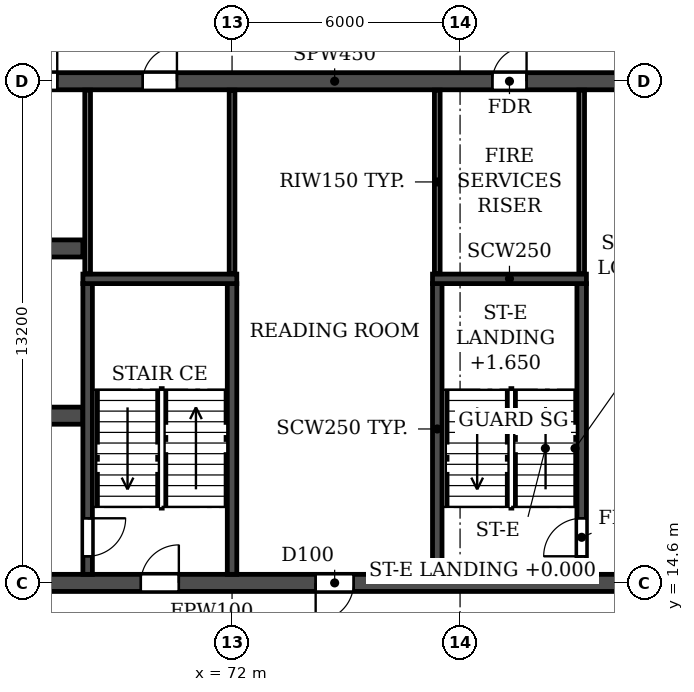
"""IFC4 building model, lengths in metres.
Left out: names, types, materials, properties, quantities, classifications, styles, units other than length and angle.
Written with IfcOpenShell. Run it as: python <this file> out.ifc"""

import sys

from ifc_helpers import new_model, si_unit, direction, frame, frame_2d, origin, place, context, subcontext, project, spatial, rectangle, extrude, element, fill, save


model = new_model("IFC4")
c1 = context("Model", 3, precision=1e-05, world=origin(), true_north=direction((0.0, 1.0)))
c2 = subcontext(c1, "Body", "Model", "MODEL_VIEW")
j1 = project(units=[si_unit("LENGTHUNIT", "METRE"), si_unit("PLANEANGLEUNIT", "RADIAN")], contexts=[c1])
p1 = place(None, origin())
s1 = spatial("IfcSite", under=j1, at=p1, CompositionType="ELEMENT")
p2 = place(p1, origin())
s2 = spatial("IfcBuilding", under=s1, at=p2, CompositionType="ELEMENT")
p3 = place(p2, frame((0.0, 0.0, 132.3)))
s3 = spatial("IfcBuildingStorey", under=s2, at=p3, CompositionType="ELEMENT", Elevation=132.3)
p4 = place(p3, frame((12.2, 14.6, 0.0), z_axis=(0.0, 0.0, 1.0), x_axis=(1.0, 0.0, 0.0)))
e1 = element("IfcWall", 1, at=p4, inside=s3, PredefinedType="SOLIDWALL", context=c2, shape_type="SweptSolid", body=[
    extrude(rectangle(XDim=77.6, YDim=0.45, at=frame_2d((38.8, 0.0))), origin(), (0.0, 0.0, 1.0), 3.07),
])
p5 = place(p4, frame((2.3, 0.0, 0.0)))
e2 = element("IfcOpeningElement", 2, at=p5, cuts=e1, PredefinedType="OPENING", context=c2, shape_type="SweptSolid", body=[
    extrude(rectangle(XDim=1.0, YDim=2.1, at=frame_2d((0.5, 1.05))), frame((0.0, 0.235, 0.0), z_axis=(0.0, -1.0, 0.0), x_axis=(1.0, 0.0, 0.0)), (0.0, 0.0, 1.0), 0.47),
])
p6 = place(p4, frame((6.7, 0.0, 0.0)))
e3 = element("IfcOpeningElement", 3, at=p6, cuts=e1, PredefinedType="OPENING", context=c2, shape_type="SweptSolid", body=[
    extrude(rectangle(XDim=1.0, YDim=2.1, at=frame_2d((0.5, 1.05))), frame((0.0, 0.235, 0.0), z_axis=(0.0, -1.0, 0.0), x_axis=(1.0, 0.0, 0.0)), (0.0, 0.0, 1.0), 0.47),
])
p7 = place(p4, frame((14.6, 0.0, 0.0)))
e4 = element("IfcOpeningElement", 4, at=p7, cuts=e1, PredefinedType="OPENING", context=c2, shape_type="SweptSolid", body=[
    extrude(rectangle(XDim=1.0, YDim=2.1, at=frame_2d((0.5, 1.05))), frame((0.0, 0.235, 0.0), z_axis=(0.0, -1.0, 0.0), x_axis=(1.0, 0.0, 0.0)), (0.0, 0.0, 1.0), 0.47),
])
p8 = place(p4, frame((19.2, 0.0, 0.0)))
e5 = element("IfcOpeningElement", 5, at=p8, cuts=e1, PredefinedType="OPENING", context=c2, shape_type="SweptSolid", body=[
    extrude(rectangle(XDim=1.0, YDim=2.1, at=frame_2d((0.5, 1.05))), frame((0.0, 0.235, 0.0), z_axis=(0.0, -1.0, 0.0), x_axis=(1.0, 0.0, 0.0)), (0.0, 0.0, 1.0), 0.47),
])
p9 = place(p4, frame((31.55, 0.0, 0.0)))
e6 = element("IfcOpeningElement", 6, at=p9, cuts=e1, PredefinedType="OPENING", context=c2, shape_type="SweptSolid", body=[
    extrude(rectangle(XDim=1.5, YDim=2.1, at=frame_2d((0.75, 1.05))), frame((0.0, 0.235, 0.0), z_axis=(0.0, -1.0, 0.0), x_axis=(1.0, 0.0, 0.0)), (0.0, 0.0, 1.0), 0.47),
])
p10 = place(p4, frame((35.7, 0.0, 0.0)))
e7 = element("IfcOpeningElement", 7, at=p10, cuts=e1, PredefinedType="OPENING", context=c2, shape_type="SweptSolid", body=[
    extrude(rectangle(XDim=1.0, YDim=2.1, at=frame_2d((0.5, 1.05))), frame((0.0, 0.235, 0.0), z_axis=(0.0, -1.0, 0.0), x_axis=(1.0, 0.0, 0.0)), (0.0, 0.0, 1.0), 0.47),
])
p11 = place(p4, frame((38.3, 0.0, 0.0)))
e8 = element("IfcOpeningElement", 8, at=p11, cuts=e1, PredefinedType="OPENING", context=c2, shape_type="SweptSolid", body=[
    extrude(rectangle(XDim=1.0, YDim=2.1, at=frame_2d((0.5, 1.05))), frame((0.0, 0.235, 0.0), z_axis=(0.0, -1.0, 0.0), x_axis=(1.0, 0.0, 0.0)), (0.0, 0.0, 1.0), 0.47),
])
p12 = place(p4, frame((40.9, 0.0, 0.0)))
e9 = element("IfcOpeningElement", 9, at=p12, cuts=e1, PredefinedType="OPENING", context=c2, shape_type="SweptSolid", body=[
    extrude(rectangle(XDim=1.0, YDim=2.1, at=frame_2d((0.5, 1.05))), frame((0.0, 0.235, 0.0), z_axis=(0.0, -1.0, 0.0), x_axis=(1.0, 0.0, 0.0)), (0.0, 0.0, 1.0), 0.47),
])
p13 = place(p4, frame((44.55, 0.0, 0.0)))
e10 = element("IfcOpeningElement", 10, at=p13, cuts=e1, PredefinedType="OPENING", context=c2, shape_type="SweptSolid", body=[
    extrude(rectangle(XDim=1.5, YDim=2.1, at=frame_2d((0.75, 1.05))), frame((0.0, 0.235, 0.0), z_axis=(0.0, -1.0, 0.0), x_axis=(1.0, 0.0, 0.0)), (0.0, 0.0, 1.0), 0.47),
])
p14 = place(p4, frame((57.4, 0.0, 0.0)))
e11 = element("IfcOpeningElement", 11, at=p14, cuts=e1, PredefinedType="OPENING", context=c2, shape_type="SweptSolid", body=[
    extrude(rectangle(XDim=1.0, YDim=2.1, at=frame_2d((0.5, 1.05))), frame((0.0, 0.235, 0.0), z_axis=(0.0, -1.0, 0.0), x_axis=(1.0, 0.0, 0.0)), (0.0, 0.0, 1.0), 0.47),
])
p15 = place(p4, frame((62.0, 0.0, 0.0)))
e12 = element("IfcOpeningElement", 12, at=p15, cuts=e1, PredefinedType="OPENING", context=c2, shape_type="SweptSolid", body=[
    extrude(rectangle(XDim=1.0, YDim=2.1, at=frame_2d((0.5, 1.05))), frame((0.0, 0.235, 0.0), z_axis=(0.0, -1.0, 0.0), x_axis=(1.0, 0.0, 0.0)), (0.0, 0.0, 1.0), 0.47),
])
p16 = place(p4, frame((69.9, 0.0, 0.0)))
e13 = element("IfcOpeningElement", 13, at=p16, cuts=e1, PredefinedType="OPENING", context=c2, shape_type="SweptSolid", body=[
    extrude(rectangle(XDim=1.0, YDim=2.1, at=frame_2d((0.5, 1.05))), frame((0.0, 0.235, 0.0), z_axis=(0.0, -1.0, 0.0), x_axis=(1.0, 0.0, 0.0)), (0.0, 0.0, 1.0), 0.47),
])
p17 = place(p4, frame((74.3, 0.0, 0.0)))
e14 = element("IfcOpeningElement", 14, at=p17, cuts=e1, PredefinedType="OPENING", context=c2, shape_type="SweptSolid", body=[
    extrude(rectangle(XDim=1.0, YDim=2.1, at=frame_2d((0.5, 1.05))), frame((0.0, 0.235, 0.0), z_axis=(0.0, -1.0, 0.0), x_axis=(1.0, 0.0, 0.0)), (0.0, 0.0, 1.0), 0.47),
])
p18 = place(p3, frame((12.2, 27.8, 0.0), z_axis=(0.0, 0.0, 1.0), x_axis=(1.0, 0.0, 0.0)))
e15 = element("IfcWall", 15, at=p18, inside=s3, PredefinedType="SOLIDWALL", context=c2, shape_type="SweptSolid", body=[
    extrude(rectangle(XDim=77.6, YDim=0.45, at=frame_2d((38.8, 0.0))), origin(), (0.0, 0.0, 1.0), 3.07),
])
p19 = place(p18, frame((2.05, 0.0, 0.0)))
e16 = element("IfcOpeningElement", 16, at=p19, cuts=e15, PredefinedType="OPENING", context=c2, shape_type="SweptSolid", body=[
    extrude(rectangle(XDim=1.5, YDim=2.1, at=frame_2d((0.75, 1.05))), frame((0.0, 0.235, 0.0), z_axis=(0.0, -1.0, 0.0), x_axis=(1.0, 0.0, 0.0)), (0.0, 0.0, 1.0), 0.47),
])
p20 = place(p18, frame((6.7, 0.0, 0.0)))
e17 = element("IfcOpeningElement", 17, at=p20, cuts=e15, PredefinedType="OPENING", context=c2, shape_type="SweptSolid", body=[
    extrude(rectangle(XDim=1.0, YDim=2.1, at=frame_2d((0.5, 1.05))), frame((0.0, 0.235, 0.0), z_axis=(0.0, -1.0, 0.0), x_axis=(1.0, 0.0, 0.0)), (0.0, 0.0, 1.0), 0.47),
])
p21 = place(p18, frame((10.05, 0.0, 0.0)))
e18 = element("IfcOpeningElement", 18, at=p21, cuts=e15, PredefinedType="OPENING", context=c2, shape_type="SweptSolid", body=[
    extrude(rectangle(XDim=0.9, YDim=2.1, at=frame_2d((0.45, 1.05))), frame((0.0, 0.235, 0.0), z_axis=(0.0, -1.0, 0.0), x_axis=(1.0, 0.0, 0.0)), (0.0, 0.0, 1.0), 0.47),
])
p22 = place(p18, frame((19.25, 0.0, 0.0)))
e19 = element("IfcOpeningElement", 19, at=p22, cuts=e15, PredefinedType="OPENING", context=c2, shape_type="SweptSolid", body=[
    extrude(rectangle(XDim=0.9, YDim=2.1, at=frame_2d((0.45, 1.05))), frame((0.0, 0.235, 0.0), z_axis=(0.0, -1.0, 0.0), x_axis=(1.0, 0.0, 0.0)), (0.0, 0.0, 1.0), 0.47),
])
p23 = place(p18, frame((22.4, 0.0, 0.0)))
e20 = element("IfcOpeningElement", 20, at=p23, cuts=e15, PredefinedType="OPENING", context=c2, shape_type="SweptSolid", body=[
    extrude(rectangle(XDim=1.0, YDim=2.1, at=frame_2d((0.5, 1.05))), frame((0.0, 0.235, 0.0), z_axis=(0.0, -1.0, 0.0), x_axis=(1.0, 0.0, 0.0)), (0.0, 0.0, 1.0), 0.47),
])
p24 = place(p18, frame((27.6, 0.0, 0.0)))
e21 = element("IfcOpeningElement", 21, at=p24, cuts=e15, PredefinedType="OPENING", context=c2, shape_type="SweptSolid", body=[
    extrude(rectangle(XDim=1.0, YDim=2.1, at=frame_2d((0.5, 1.05))), frame((0.0, 0.235, 0.0), z_axis=(0.0, -1.0, 0.0), x_axis=(1.0, 0.0, 0.0)), (0.0, 0.0, 1.0), 0.47),
])
p25 = place(p18, frame((35.4, 0.0, 0.0)))
e22 = element("IfcOpeningElement", 22, at=p25, cuts=e15, PredefinedType="OPENING", context=c2, shape_type="SweptSolid", body=[
    extrude(rectangle(XDim=1.0, YDim=2.1, at=frame_2d((0.5, 1.05))), frame((0.0, 0.235, 0.0), z_axis=(0.0, -1.0, 0.0), x_axis=(1.0, 0.0, 0.0)), (0.0, 0.0, 1.0), 0.47),
])
p26 = place(p18, frame((38.3, 0.0, 0.0)))
e23 = element("IfcOpeningElement", 23, at=p26, cuts=e15, PredefinedType="OPENING", context=c2, shape_type="SweptSolid", body=[
    extrude(rectangle(XDim=1.0, YDim=2.1, at=frame_2d((0.5, 1.05))), frame((0.0, 0.235, 0.0), z_axis=(0.0, -1.0, 0.0), x_axis=(1.0, 0.0, 0.0)), (0.0, 0.0, 1.0), 0.47),
])
p27 = place(p18, frame((41.2, 0.0, 0.0)))
e24 = element("IfcOpeningElement", 24, at=p27, cuts=e15, PredefinedType="OPENING", context=c2, shape_type="SweptSolid", body=[
    extrude(rectangle(XDim=1.0, YDim=2.1, at=frame_2d((0.5, 1.05))), frame((0.0, 0.235, 0.0), z_axis=(0.0, -1.0, 0.0), x_axis=(1.0, 0.0, 0.0)), (0.0, 0.0, 1.0), 0.47),
])
p28 = place(p18, frame((43.8, 0.0, 0.0)))
e25 = element("IfcOpeningElement", 25, at=p28, cuts=e15, PredefinedType="OPENING", context=c2, shape_type="SweptSolid", body=[
    extrude(rectangle(XDim=1.0, YDim=2.1, at=frame_2d((0.5, 1.05))), frame((0.0, 0.235, 0.0), z_axis=(0.0, -1.0, 0.0), x_axis=(1.0, 0.0, 0.0)), (0.0, 0.0, 1.0), 0.47),
])
p29 = place(p18, frame((47.7, 0.0, 0.0)))
e26 = element("IfcOpeningElement", 26, at=p29, cuts=e15, PredefinedType="OPENING", context=c2, shape_type="SweptSolid", body=[
    extrude(rectangle(XDim=1.0, YDim=2.1, at=frame_2d((0.5, 1.05))), frame((0.0, 0.235, 0.0), z_axis=(0.0, -1.0, 0.0), x_axis=(1.0, 0.0, 0.0)), (0.0, 0.0, 1.0), 0.47),
])
p30 = place(p18, frame((51.6, 0.0, 0.0)))
e27 = element("IfcOpeningElement", 27, at=p30, cuts=e15, PredefinedType="OPENING", context=c2, shape_type="SweptSolid", body=[
    extrude(rectangle(XDim=1.0, YDim=2.1, at=frame_2d((0.5, 1.05))), frame((0.0, 0.235, 0.0), z_axis=(0.0, -1.0, 0.0), x_axis=(1.0, 0.0, 0.0)), (0.0, 0.0, 1.0), 0.47),
])
p31 = place(p18, frame((54.2, 0.0, 0.0)))
e28 = element("IfcOpeningElement", 28, at=p31, cuts=e15, PredefinedType="OPENING", context=c2, shape_type="SweptSolid", body=[
    extrude(rectangle(XDim=1.0, YDim=2.1, at=frame_2d((0.5, 1.05))), frame((0.0, 0.235, 0.0), z_axis=(0.0, -1.0, 0.0), x_axis=(1.0, 0.0, 0.0)), (0.0, 0.0, 1.0), 0.47),
])
p32 = place(p18, frame((57.45, 0.0, 0.0)))
e29 = element("IfcOpeningElement", 29, at=p32, cuts=e15, PredefinedType="OPENING", context=c2, shape_type="SweptSolid", body=[
    extrude(rectangle(XDim=0.9, YDim=2.1, at=frame_2d((0.45, 1.05))), frame((0.0, 0.235, 0.0), z_axis=(0.0, -1.0, 0.0), x_axis=(1.0, 0.0, 0.0)), (0.0, 0.0, 1.0), 0.47),
])
p33 = place(p18, frame((66.65, 0.0, 0.0)))
e30 = element("IfcOpeningElement", 30, at=p33, cuts=e15, PredefinedType="OPENING", context=c2, shape_type="SweptSolid", body=[
    extrude(rectangle(XDim=0.9, YDim=2.1, at=frame_2d((0.45, 1.05))), frame((0.0, 0.235, 0.0), z_axis=(0.0, -1.0, 0.0), x_axis=(1.0, 0.0, 0.0)), (0.0, 0.0, 1.0), 0.47),
])
p34 = place(p18, frame((69.9, 0.0, 0.0)))
e31 = element("IfcOpeningElement", 31, at=p34, cuts=e15, PredefinedType="OPENING", context=c2, shape_type="SweptSolid", body=[
    extrude(rectangle(XDim=1.0, YDim=2.1, at=frame_2d((0.5, 1.05))), frame((0.0, 0.235, 0.0), z_axis=(0.0, -1.0, 0.0), x_axis=(1.0, 0.0, 0.0)), (0.0, 0.0, 1.0), 0.47),
])
p35 = place(p18, frame((74.3, 0.0, 0.0)))
e32 = element("IfcOpeningElement", 32, at=p35, cuts=e15, PredefinedType="OPENING", context=c2, shape_type="SweptSolid", body=[
    extrude(rectangle(XDim=1.0, YDim=2.1, at=frame_2d((0.5, 1.05))), frame((0.0, 0.235, 0.0), z_axis=(0.0, -1.0, 0.0), x_axis=(1.0, 0.0, 0.0)), (0.0, 0.0, 1.0), 0.47),
])
p36 = place(p3, frame((33.925, 19.0, 0.0), z_axis=(0.0, 0.0, 1.0), x_axis=(1.0, 0.0, 0.0)))
e33 = element("IfcWall", 33, at=p36, inside=s3, PredefinedType="SOLIDWALL", context=c2, shape_type="SweptSolid", body=[
    extrude(rectangle(XDim=34.15, YDim=0.45, at=frame_2d((17.075, 0.0))), origin(), (0.0, 0.0, 1.0), 3.07),
])
p37 = place(p36, frame((16.175, 0.0, 0.0)))
e34 = element("IfcOpeningElement", 34, at=p37, cuts=e33, PredefinedType="OPENING", context=c2, shape_type="SweptSolid", body=[
    extrude(rectangle(XDim=1.8, YDim=2.1, at=frame_2d((0.9, 1.05))), frame((0.0, 0.235, 0.0), z_axis=(0.0, -1.0, 0.0), x_axis=(1.0, 0.0, 0.0)), (0.0, 0.0, 1.0), 0.47),
])
p38 = place(p36, frame((1.525, 0.0, 0.0)))
e35 = element("IfcOpeningElement", 35, at=p38, cuts=e33, PredefinedType="OPENING", context=c2, shape_type="SweptSolid", body=[
    extrude(rectangle(XDim=1.8, YDim=2.1, at=frame_2d((0.9, 1.05))), frame((0.0, 0.235, 0.0), z_axis=(0.0, -1.0, 0.0), x_axis=(1.0, 0.0, 0.0)), (0.0, 0.0, 1.0), 0.47),
])
p39 = place(p36, frame((30.825, 0.0, 0.0)))
e36 = element("IfcOpeningElement", 36, at=p39, cuts=e33, PredefinedType="OPENING", context=c2, shape_type="SweptSolid", body=[
    extrude(rectangle(XDim=1.8, YDim=2.1, at=frame_2d((0.9, 1.05))), frame((0.0, 0.235, 0.0), z_axis=(0.0, -1.0, 0.0), x_axis=(1.0, 0.0, 0.0)), (0.0, 0.0, 1.0), 0.47),
])
p40 = place(p3, frame((33.925, 23.4, 0.0), z_axis=(0.0, 0.0, 1.0), x_axis=(1.0, 0.0, 0.0)))
e37 = element("IfcWall", 37, at=p40, inside=s3, PredefinedType="SOLIDWALL", context=c2, shape_type="SweptSolid", body=[
    extrude(rectangle(XDim=34.15, YDim=0.45, at=frame_2d((17.075, 0.0))), origin(), (0.0, 0.0, 1.0), 3.07),
])
p41 = place(p40, frame((16.175, 0.0, 0.0)))
e38 = element("IfcOpeningElement", 38, at=p41, cuts=e37, PredefinedType="OPENING", context=c2, shape_type="SweptSolid", body=[
    extrude(rectangle(XDim=1.8, YDim=2.1, at=frame_2d((0.9, 1.05))), frame((0.0, 0.235, 0.0), z_axis=(0.0, -1.0, 0.0), x_axis=(1.0, 0.0, 0.0)), (0.0, 0.0, 1.0), 0.47),
])
p42 = place(p40, frame((0.625, 0.0, 0.0)))
e39 = element("IfcOpeningElement", 39, at=p42, cuts=e37, PredefinedType="OPENING", context=c2, shape_type="SweptSolid", body=[
    extrude(rectangle(XDim=1.1, YDim=2.1, at=frame_2d((0.55, 1.05))), frame((0.0, 0.235, 0.0), z_axis=(0.0, -1.0, 0.0), x_axis=(1.0, 0.0, 0.0)), (0.0, 0.0, 1.0), 0.47),
])
p43 = place(p40, frame((3.225, 0.0, 0.0)))
e40 = element("IfcOpeningElement", 40, at=p43, cuts=e37, PredefinedType="OPENING", context=c2, shape_type="SweptSolid", body=[
    extrude(rectangle(XDim=1.1, YDim=2.1, at=frame_2d((0.55, 1.05))), frame((0.0, 0.235, 0.0), z_axis=(0.0, -1.0, 0.0), x_axis=(1.0, 0.0, 0.0)), (0.0, 0.0, 1.0), 0.47),
])
p44 = place(p40, frame((5.825, 0.0, 0.0)))
e41 = element("IfcOpeningElement", 41, at=p44, cuts=e37, PredefinedType="OPENING", context=c2, shape_type="SweptSolid", body=[
    extrude(rectangle(XDim=1.1, YDim=2.1, at=frame_2d((0.55, 1.05))), frame((0.0, 0.235, 0.0), z_axis=(0.0, -1.0, 0.0), x_axis=(1.0, 0.0, 0.0)), (0.0, 0.0, 1.0), 0.47),
])
p45 = place(p40, frame((8.425, 0.0, 0.0)))
e42 = element("IfcOpeningElement", 42, at=p45, cuts=e37, PredefinedType="OPENING", context=c2, shape_type="SweptSolid", body=[
    extrude(rectangle(XDim=1.1, YDim=2.1, at=frame_2d((0.55, 1.05))), frame((0.0, 0.235, 0.0), z_axis=(0.0, -1.0, 0.0), x_axis=(1.0, 0.0, 0.0)), (0.0, 0.0, 1.0), 0.47),
])
p46 = place(p40, frame((11.025, 0.0, 0.0)))
e43 = element("IfcOpeningElement", 43, at=p46, cuts=e37, PredefinedType="OPENING", context=c2, shape_type="SweptSolid", body=[
    extrude(rectangle(XDim=1.1, YDim=2.1, at=frame_2d((0.55, 1.05))), frame((0.0, 0.235, 0.0), z_axis=(0.0, -1.0, 0.0), x_axis=(1.0, 0.0, 0.0)), (0.0, 0.0, 1.0), 0.47),
])
p47 = place(p40, frame((13.625, 0.0, 0.0)))
e44 = element("IfcOpeningElement", 44, at=p47, cuts=e37, PredefinedType="OPENING", context=c2, shape_type="SweptSolid", body=[
    extrude(rectangle(XDim=1.1, YDim=2.1, at=frame_2d((0.55, 1.05))), frame((0.0, 0.235, 0.0), z_axis=(0.0, -1.0, 0.0), x_axis=(1.0, 0.0, 0.0)), (0.0, 0.0, 1.0), 0.47),
])
p48 = place(p40, frame((27.225, 0.0, 0.0)))
e45 = element("IfcOpeningElement", 45, at=p48, cuts=e37, PredefinedType="OPENING", context=c2, shape_type="SweptSolid", body=[
    extrude(rectangle(XDim=1.1, YDim=2.1, at=frame_2d((0.55, 1.05))), frame((0.0, 0.235, 0.0), z_axis=(0.0, -1.0, 0.0), x_axis=(1.0, 0.0, 0.0)), (0.0, 0.0, 1.0), 0.47),
])
p49 = place(p3, frame((68.2, 14.825, 0.0), z_axis=(0.0, 0.0, 1.0), x_axis=(0.0, 1.0, 0.0)))
e46 = element("IfcWall", 46, at=p49, inside=s3, PredefinedType="SOLIDWALL", context=c2, shape_type="SweptSolid", body=[
    extrude(rectangle(XDim=7.65, YDim=0.25, at=frame_2d((3.825, 0.0))), origin(), (0.0, 0.0, 1.0), 3.07),
])
p50 = place(p49, frame((0.475, 0.0, 0.0)))
e47 = element("IfcOpeningElement", 47, at=p50, cuts=e46, PredefinedType="OPENING", context=c2, shape_type="SweptSolid", body=[
    extrude(rectangle(XDim=1.0, YDim=2.1, at=frame_2d((0.5, 1.05))), frame((0.0, 0.135, 0.0), z_axis=(0.0, -1.0, 0.0), x_axis=(1.0, 0.0, 0.0)), (0.0, 0.0, 1.0), 0.27),
])
p51 = place(p3, frame((72.0, 14.825, 0.0), z_axis=(0.0, 0.0, 1.0), x_axis=(0.0, 1.0, 0.0)))
e48 = element("IfcWall", 48, at=p51, inside=s3, PredefinedType="SOLIDWALL", context=c2, shape_type="SweptSolid", body=[
    extrude(rectangle(XDim=7.65, YDim=0.25, at=frame_2d((3.825, 0.0))), origin(), (0.0, 0.0, 1.0), 3.07),
])
p52 = place(p3, frame((68.075, 22.6, 0.0), z_axis=(0.0, 0.0, 1.0), x_axis=(1.0, 0.0, 0.0)))
e49 = element("IfcWall", 49, at=p52, inside=s3, PredefinedType="SOLIDWALL", context=c2, shape_type="SweptSolid", body=[
    extrude(rectangle(XDim=4.05, YDim=0.25, at=frame_2d((2.025, 0.0))), origin(), (0.0, 0.0, 1.0), 3.07),
])
p53 = place(p3, frame((77.4, 14.825, 0.0), z_axis=(0.0, 0.0, 1.0), x_axis=(0.0, 1.0, 0.0)))
e50 = element("IfcWall", 50, at=p53, inside=s3, PredefinedType="SOLIDWALL", context=c2, shape_type="SweptSolid", body=[
    extrude(rectangle(XDim=7.65, YDim=0.25, at=frame_2d((3.825, 0.0))), origin(), (0.0, 0.0, 1.0), 3.07),
])
p54 = place(p3, frame((81.2, 14.825, 0.0), z_axis=(0.0, 0.0, 1.0), x_axis=(0.0, 1.0, 0.0)))
e51 = element("IfcWall", 51, at=p54, inside=s3, PredefinedType="SOLIDWALL", context=c2, shape_type="SweptSolid", body=[
    extrude(rectangle(XDim=7.65, YDim=0.25, at=frame_2d((3.825, 0.0))), origin(), (0.0, 0.0, 1.0), 3.07),
])
p55 = place(p54, frame((0.475, 0.0, 0.0)))
e52 = element("IfcOpeningElement", 52, at=p55, cuts=e51, PredefinedType="OPENING", context=c2, shape_type="SweptSolid", body=[
    extrude(rectangle(XDim=1.0, YDim=2.1, at=frame_2d((0.5, 1.05))), frame((0.0, 0.135, 0.0), z_axis=(0.0, -1.0, 0.0), x_axis=(1.0, 0.0, 0.0)), (0.0, 0.0, 1.0), 0.27),
])
p56 = place(p3, frame((77.275, 22.6, 0.0), z_axis=(0.0, 0.0, 1.0), x_axis=(1.0, 0.0, 0.0)))
e53 = element("IfcWall", 53, at=p56, inside=s3, PredefinedType="SOLIDWALL", context=c2, shape_type="SweptSolid", body=[
    extrude(rectangle(XDim=4.05, YDim=0.25, at=frame_2d((2.025, 0.0))), origin(), (0.0, 0.0, 1.0), 3.07),
])
for number, where, z_axis, x_axis in (
    (54, (68.2, 22.735, 0.0), (0.0, 0.0, 1.0), (0.0, 1.0, 0.0)),
    (55, (72.0, 22.735, 0.0), (0.0, 0.0, 1.0), (0.0, 1.0, 0.0)),
    (56, (77.4, 22.735, 0.0), (0.0, 0.0, 1.0), (0.0, 1.0, 0.0)),
    (57, (81.2, 22.735, 0.0), (0.0, 0.0, 1.0), (0.0, 1.0, 0.0)),
):
    element("IfcWall", number, at=place(p3, frame(where, z_axis=z_axis, x_axis=x_axis)), inside=s3, PredefinedType="PARTITIONING", context=c2, shape_type="SweptSolid", body=[
        extrude(rectangle(XDim=4.83, YDim=0.15, at=frame_2d((2.415, 0.0))), origin(), (0.0, 0.0, 1.0), 3.07),
    ])
p57 = place(p31, origin())
e58 = element("IfcDoor", 58, at=p57, inside=s3, OperationType="SINGLE_SWING_RIGHT", PredefinedType="DOOR", context=c2, shape_type="SweptSolid", body=[
    extrude(rectangle(XDim=1.0, YDim=2.1, at=frame_2d((0.5, 1.05))), frame((0.0, 0.025, 0.0), z_axis=(0.0, -1.0, 0.0), x_axis=(1.0, 0.0, 0.0)), (0.0, 0.0, 1.0), 0.05),
])
fill(e28, e58)
p58 = place(p32, origin())
e59 = element("IfcDoor", 59, at=p58, inside=s3, OperationType="SINGLE_SWING_RIGHT", PredefinedType="DOOR", context=c2, shape_type="SweptSolid", body=[
    extrude(rectangle(XDim=0.9, YDim=2.1, at=frame_2d((0.45, 1.05))), frame((0.0, 0.025, 0.0), z_axis=(0.0, -1.0, 0.0), x_axis=(1.0, 0.0, 0.0)), (0.0, 0.0, 1.0), 0.05),
])
fill(e29, e59)
p59 = place(p33, origin())
e60 = element("IfcDoor", 60, at=p59, inside=s3, OperationType="SINGLE_SWING_RIGHT", PredefinedType="DOOR", context=c2, shape_type="SweptSolid", body=[
    extrude(rectangle(XDim=0.9, YDim=2.1, at=frame_2d((0.45, 1.05))), frame((0.0, 0.025, 0.0), z_axis=(0.0, -1.0, 0.0), x_axis=(1.0, 0.0, 0.0)), (0.0, 0.0, 1.0), 0.05),
])
fill(e30, e60)
p60 = place(p14, origin())
e61 = element("IfcDoor", 61, at=p60, inside=s3, OperationType="SINGLE_SWING_RIGHT", PredefinedType="DOOR", context=c2, shape_type="SweptSolid", body=[
    extrude(rectangle(XDim=1.0, YDim=2.1, at=frame_2d((0.5, 1.05))), frame((0.0, 0.025, 0.0), z_axis=(0.0, -1.0, 0.0), x_axis=(1.0, 0.0, 0.0)), (0.0, 0.0, 1.0), 0.05),
])
fill(e11, e61)
p61 = place(p15, frame((1.0, 0.0, 0.0), z_axis=(0.0, 0.0, 1.0), x_axis=(-1.0, 0.0, 0.0)))
e62 = element("IfcDoor", 62, at=p61, inside=s3, OperationType="SINGLE_SWING_RIGHT", PredefinedType="DOOR", context=c2, shape_type="SweptSolid", body=[
    extrude(rectangle(XDim=1.0, YDim=2.1, at=frame_2d((0.5, 1.05))), frame((0.0, 0.025, 0.0), z_axis=(0.0, -1.0, 0.0), x_axis=(1.0, 0.0, 0.0)), (0.0, 0.0, 1.0), 0.05),
])
fill(e12, e62)
p62 = place(p50, frame((1.0, 0.0, 0.0), z_axis=(0.0, 0.0, 1.0), x_axis=(-1.0, 0.0, 0.0)))
e63 = element("IfcDoor", 63, at=p62, inside=s3, OperationType="SINGLE_SWING_LEFT", PredefinedType="DOOR", context=c2, shape_type="SweptSolid", body=[
    extrude(rectangle(XDim=1.0, YDim=2.1, at=frame_2d((0.5, 1.05))), frame((0.0, 0.025, 0.0), z_axis=(0.0, -1.0, 0.0), x_axis=(1.0, 0.0, 0.0)), (0.0, 0.0, 1.0), 0.05),
])
fill(e47, e63)
p63 = place(p55, origin())
e64 = element("IfcDoor", 64, at=p63, inside=s3, OperationType="SINGLE_SWING_LEFT", PredefinedType="DOOR", context=c2, shape_type="SweptSolid", body=[
    extrude(rectangle(XDim=1.0, YDim=2.1, at=frame_2d((0.5, 1.05))), frame((0.0, 0.025, 0.0), z_axis=(0.0, -1.0, 0.0), x_axis=(1.0, 0.0, 0.0)), (0.0, 0.0, 1.0), 0.05),
])
fill(e52, e64)
save(model, sys.argv[1])
